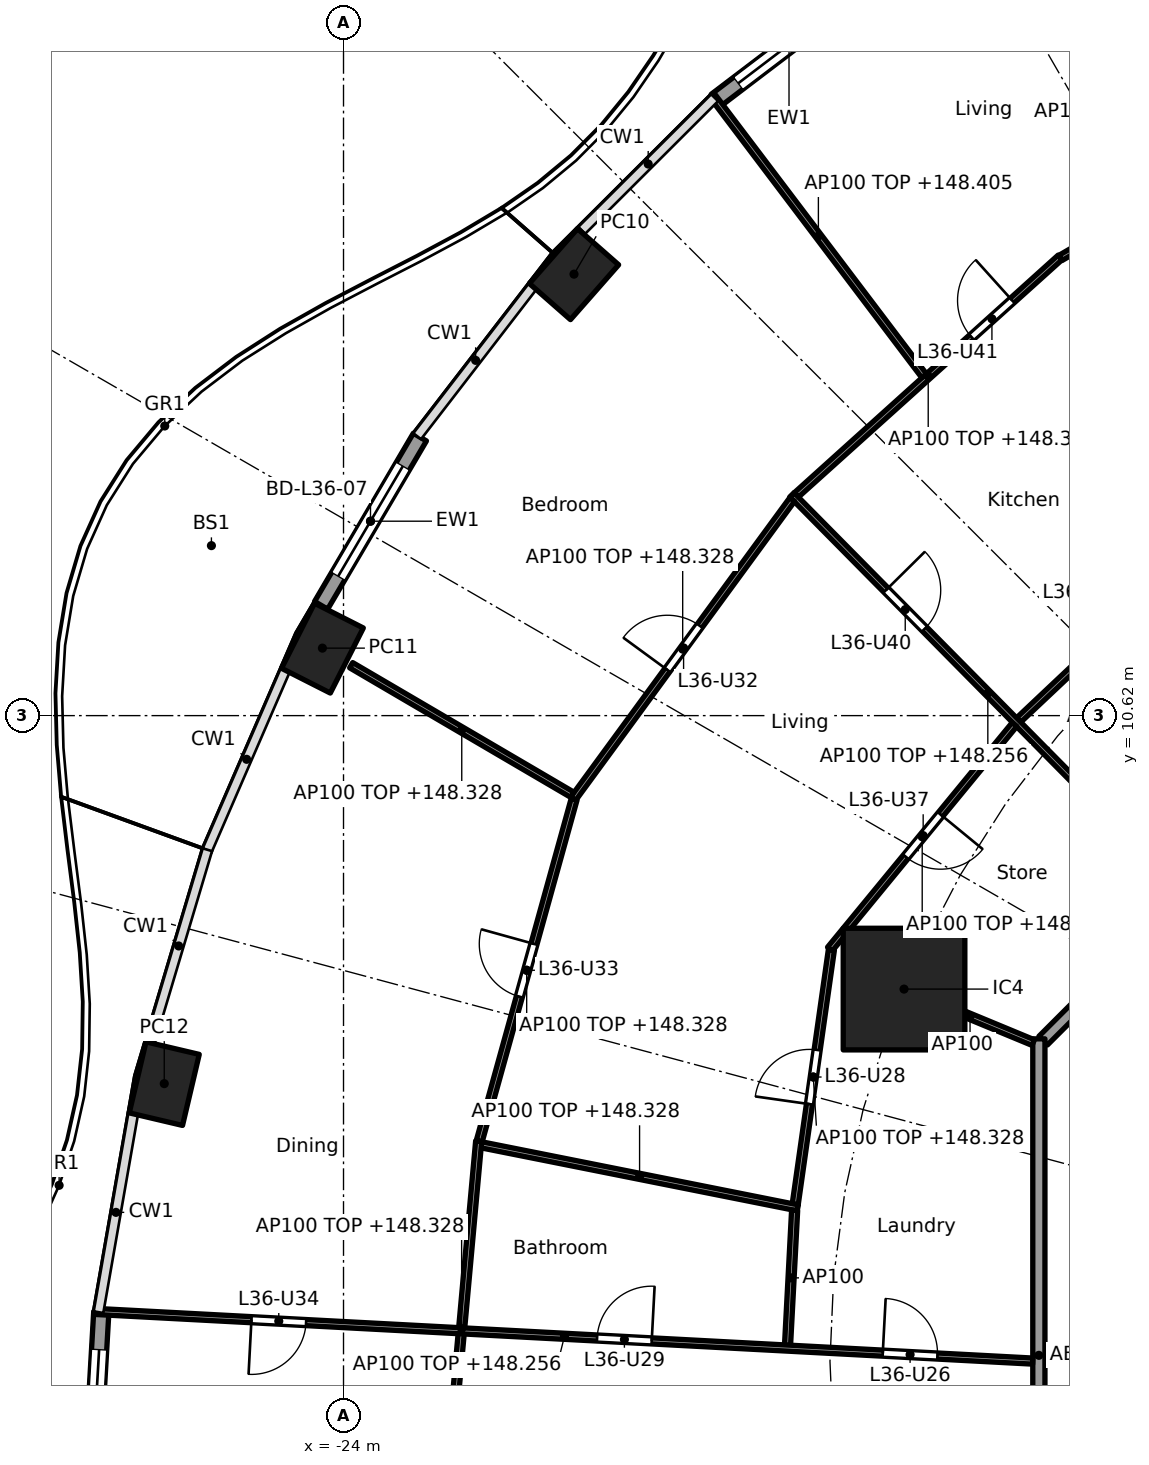
"""IFC4 building model, lengths in metres.
Left out: names, types, materials, properties, quantities, classifications, styles, units other than length and angle.
Written with IfcOpenShell. Run it as: python <this file> out.ifc"""

import sys

from ifc_helpers import new_model, si_unit, direction, frame, frame_2d, origin, origin_2d, place, context, subcontext, project, spatial, rectangle, hollow_rectangle, extrude, element, fill, save


model = new_model("IFC4")
c1 = context("Model", 3, precision=1e-05, world=origin(), true_north=direction((0.0, 1.0)))
c2 = subcontext(c1, "Body", "Model", "MODEL_VIEW")
j1 = project(units=[si_unit("LENGTHUNIT", "METRE"), si_unit("PLANEANGLEUNIT", "RADIAN")], contexts=[c1])
p1 = place(None, origin())
s1 = spatial("IfcSite", under=j1, at=p1, CompositionType="ELEMENT")
p2 = place(p1, origin())
s2 = spatial("IfcBuilding", under=s1, at=p2, CompositionType="ELEMENT")
p3 = place(p2, frame((0.0, 0.0, 145.5)))
s3 = spatial("IfcBuildingStorey", under=s2, at=p3, CompositionType="ELEMENT", Elevation=145.5)
for number, where, z_axis, x_axis in (
    (1, (-20.209, 17.88, 0.0), (0.0, 0.0, 1.0), (-0.66, -0.751, 0.0)),
    (2, (-24.347, 11.73, 0.0), (0.0, 0.0, 1.0), (-0.452, -0.892, 0.0)),
    (3, (-26.948, 4.568, 0.0), (0.0, 0.0, 1.0), (-0.229, -0.973, 0.0)),
):
    element("IfcColumn", number, at=place(p3, frame(where, z_axis=z_axis, x_axis=x_axis)), inside=s3, PredefinedType="COLUMN", context=c2, shape_type="SweptSolid", body=[
        extrude(hollow_rectangle(XDim=1.2, YDim=0.9, WallThickness=0.04, at=origin_2d()), origin(), (0.0, 0.0, 1.0), 3.7),
    ])
p4 = place(p3, frame((-14.782, 6.123, 0.0), z_axis=(0.0, 0.0, 1.0), x_axis=(1.0, 0.0, 0.0)))
e4 = element("IfcColumn", 4, at=p4, inside=s3, PredefinedType="COLUMN", context=c2, shape_type="SweptSolid", body=[
    extrude(rectangle(XDim=2.0, YDim=2.0, at=origin_2d()), origin(), (0.0, 0.0, 1.0), 3.7),
])
p5 = place(p3, frame((-17.878, 20.738, 0.0), z_axis=(0.0, 0.0, 1.0), x_axis=(0.796022231079, 0.605267385233, 0.0)))
e5 = element("IfcWall", 5, at=p5, inside=s3, PredefinedType="SOLIDWALL", context=c2, shape_type="SweptSolid", body=[
    extrude(rectangle(XDim=3.026, YDim=0.25, at=frame_2d((1.513, 0.0))), origin(), (0.0, 0.0, 1.0), 3.44),
])
p6 = place(p5, frame((0.463, 0.0, 0.0)))
e6 = element("IfcOpeningElement", 6, at=p6, cuts=e5, PredefinedType="OPENING", context=c2, shape_type="SweptSolid", body=[
    extrude(rectangle(XDim=2.1, YDim=2.4, at=frame_2d((1.05, 1.2))), frame((0.0, 0.135, 0.0), z_axis=(0.0, -1.0, 0.0), x_axis=(1.0, 0.0, 0.0)), (0.0, 0.0, 1.0), 0.27),
])
p7 = place(p3, frame((-24.368, 12.434, 0.0), z_axis=(0.0, 0.0, 1.0), x_axis=(0.506314982873, 0.862348617508, 0.0)))
e7 = element("IfcWall", 7, at=p7, inside=s3, PredefinedType="SOLIDWALL", context=c2, shape_type="SweptSolid", body=[
    extrude(rectangle(XDim=3.208, YDim=0.25, at=frame_2d((1.604, 0.0))), origin(), (0.0, 0.0, 1.0), 3.44),
])
p8 = place(p7, frame((0.554, 0.0, 0.0)))
e8 = element("IfcOpeningElement", 8, at=p8, cuts=e7, PredefinedType="OPENING", context=c2, shape_type="SweptSolid", body=[
    extrude(rectangle(XDim=2.1, YDim=2.4, at=frame_2d((1.05, 1.2))), frame((0.0, 0.135, 0.0), z_axis=(0.0, -1.0, 0.0), x_axis=(1.0, 0.0, 0.0)), (0.0, 0.0, 1.0), 0.27),
])
p9 = place(p3, frame((-28.176, -2.526, 0.0), z_axis=(0.0, 0.0, 1.0), x_axis=(0.057537829427, 0.998343326809, 0.0)))
e9 = element("IfcWall", 9, at=p9, inside=s3, PredefinedType="SOLIDWALL", context=c2, shape_type="SweptSolid", body=[
    extrude(rectangle(XDim=3.348, YDim=0.25, at=frame_2d((1.674, 0.0))), origin(), (0.0, 0.0, 1.0), 3.44),
])
p10 = place(p9, frame((0.624, 0.0, 0.0)))
e10 = element("IfcOpeningElement", 10, at=p10, cuts=e9, PredefinedType="OPENING", context=c2, shape_type="SweptSolid", body=[
    extrude(rectangle(XDim=2.1, YDim=2.4, at=frame_2d((1.05, 1.2))), frame((0.0, 0.135, 0.0), z_axis=(0.0, -1.0, 0.0), x_axis=(1.0, 0.0, 0.0)), (0.0, 0.0, 1.0), 0.27),
])
p11 = place(p3, frame((-5.275, 12.494, 0.0), z_axis=(0.0, 0.0, 1.0), x_axis=(-0.707106781187, -0.707106781187, 0.0)))
e11 = element("IfcWall", 11, at=p11, inside=s3, PredefinedType="PARTITIONING", context=c2, shape_type="SweptSolid", body=[
    extrude(rectangle(XDim=10.209, YDim=0.2, at=frame_2d((5.104, 0.0))), origin(), (0.0, 0.0, 1.0), 3.44),
])
p12 = place(p3, frame((-12.565, 5.304, 0.0), z_axis=(0.0, 0.0, 1.0), x_axis=(0.0, -1.0, 0.0)))
e12 = element("IfcWall", 12, at=p12, inside=s3, PredefinedType="PARTITIONING", context=c2, shape_type="SweptSolid", body=[
    extrude(rectangle(XDim=10.409, YDim=0.2, at=frame_2d((5.205, 0.0))), origin(), (0.0, 0.0, 1.0), 3.44),
])
p13 = place(p12, frame((6.539, 0.0, 0.0)))
e13 = element("IfcOpeningElement", 13, at=p13, cuts=e12, PredefinedType="OPENING", context=c2, shape_type="SweptSolid", body=[
    extrude(rectangle(XDim=1.0, YDim=2.1, at=frame_2d((0.5, 1.05))), frame((0.0, 0.11, 0.0), z_axis=(0.0, -1.0, 0.0), x_axis=(1.0, 0.0, 0.0)), (0.0, 0.0, 1.0), 0.22),
])
p14 = place(p3, frame((-7.543, 20.853, 0.0), z_axis=(0.0, 0.0, 1.0), x_axis=(-0.865086194899, -0.501623240485, 0.0)))
e14 = element("IfcWall", 14, at=p14, inside=s3, PredefinedType="PARTITIONING", context=c2, shape_type="SweptSolid", body=[
    extrude(rectangle(XDim=5.393, YDim=0.1, at=frame_2d((2.697, 0.0))), origin(), (0.0, 0.0, 1.0), 2.828),
])
p15 = place(p3, frame((-9.622, 13.634, 0.0), z_axis=(0.0, 0.0, 1.0), x_axis=(-0.727710859679, -0.685884031528, 0.0)))
e15 = element("IfcWall", 15, at=p15, inside=s3, PredefinedType="PARTITIONING", context=c2, shape_type="SweptSolid", body=[
    extrude(rectangle(XDim=4.5, YDim=0.1, at=frame_2d((2.25, 0.0))), origin(), (0.0, 0.0, 1.0), 2.828),
])
p16 = place(p15, frame((1.825, 0.0, 0.0)))
e16 = element("IfcOpeningElement", 16, at=p16, cuts=e15, PredefinedType="OPENING", context=c2, shape_type="SweptSolid", body=[
    extrude(rectangle(XDim=0.9, YDim=2.1, at=frame_2d((0.45, 1.05))), frame((0.0, 0.06, 0.0), z_axis=(0.0, -1.0, 0.0), x_axis=(1.0, 0.0, 0.0)), (0.0, 0.0, 1.0), 0.12),
])
p17 = place(p3, frame((-12.215, 18.156, 0.0), z_axis=(0.0, 0.0, 1.0), x_axis=(-0.743159001815, -0.669114861606, 0.0)))
e17 = element("IfcWall", 17, at=p17, inside=s3, PredefinedType="PARTITIONING", context=c2, shape_type="SweptSolid", body=[
    extrude(rectangle(XDim=5.839, YDim=0.1, at=frame_2d((2.92, 0.0))), origin(), (0.0, 0.0, 1.0), 2.828),
])
p18 = place(p17, frame((1.06, 0.0, 0.0)))
e18 = element("IfcOpeningElement", 18, at=p18, cuts=e17, PredefinedType="OPENING", context=c2, shape_type="SweptSolid", body=[
    extrude(rectangle(XDim=0.9, YDim=2.1, at=frame_2d((0.45, 1.05))), frame((0.0, 0.06, 0.0), z_axis=(0.0, -1.0, 0.0), x_axis=(1.0, 0.0, 0.0)), (0.0, 0.0, 1.0), 0.12),
])
p19 = place(p3, frame((-14.452, 16.208, 0.0), z_axis=(0.0, 0.0, 1.0), x_axis=(-0.603267974074, 0.797538557975, 0.0)))
e19 = element("IfcWall", 19, at=p19, inside=s3, PredefinedType="PARTITIONING", context=c2, shape_type="SweptSolid", body=[
    extrude(rectangle(XDim=5.764, YDim=0.1, at=frame_2d((2.882, 0.0))), origin(), (0.0, 0.0, 1.0), 2.905),
])
p20 = place(p3, frame((-10.182, 7.729, 0.0), z_axis=(0.0, 0.0, 1.0), x_axis=(-0.702927211734, 0.711261790766, 0.0)))
e20 = element("IfcWall", 20, at=p20, inside=s3, PredefinedType="PARTITIONING", context=c2, shape_type="SweptSolid", body=[
    extrude(rectangle(XDim=9.168, YDim=0.1, at=frame_2d((4.584, 0.0))), origin(), (0.0, 0.0, 1.0), 2.756),
])
p21 = place(p20, frame((6.067, 0.0, 0.0)))
e21 = element("IfcOpeningElement", 21, at=p21, cuts=e20, PredefinedType="OPENING", context=c2, shape_type="SweptSolid", body=[
    extrude(rectangle(XDim=0.9, YDim=2.1, at=frame_2d((0.45, 1.05))), frame((0.0, 0.06, 0.0), z_axis=(0.0, -1.0, 0.0), x_axis=(1.0, 0.0, 0.0)), (0.0, 0.0, 1.0), 0.12),
])
p22 = place(p3, frame((-12.965, 10.475, 0.0), z_axis=(0.0, 0.0, 1.0), x_axis=(-0.634932102074, -0.772567942485, 0.0)))
e22 = element("IfcWall", 22, at=p22, inside=s3, PredefinedType="PARTITIONING", context=c2, shape_type="SweptSolid", body=[
    extrude(rectangle(XDim=4.782, YDim=0.1, at=frame_2d((2.391, 0.0))), origin(), (0.0, 0.0, 1.0), 2.828),
])
p23 = place(p22, frame((1.916, 0.0, 0.0)))
e23 = element("IfcOpeningElement", 23, at=p23, cuts=e22, PredefinedType="OPENING", context=c2, shape_type="SweptSolid", body=[
    extrude(rectangle(XDim=0.9, YDim=2.1, at=frame_2d((0.45, 1.05))), frame((0.0, 0.06, 0.0), z_axis=(0.0, -1.0, 0.0), x_axis=(1.0, 0.0, 0.0)), (0.0, 0.0, 1.0), 0.12),
])
p24 = place(p3, frame((-16.621, 14.174, 0.0), z_axis=(0.0, 0.0, 1.0), x_axis=(-0.590672767272, -0.806911198338, 0.0)))
e24 = element("IfcWall", 24, at=p24, inside=s3, PredefinedType="PARTITIONING", context=c2, shape_type="SweptSolid", body=[
    extrude(rectangle(XDim=6.099, YDim=0.1, at=frame_2d((3.05, 0.0))), origin(), (0.0, 0.0, 1.0), 2.828),
])
p25 = place(p24, frame((2.574, 0.0, 0.0)))
e25 = element("IfcOpeningElement", 25, at=p25, cuts=e24, PredefinedType="OPENING", context=c2, shape_type="SweptSolid", body=[
    extrude(rectangle(XDim=0.9, YDim=2.1, at=frame_2d((0.45, 1.05))), frame((0.0, 0.06, 0.0), z_axis=(0.0, -1.0, 0.0), x_axis=(1.0, 0.0, 0.0)), (0.0, 0.0, 1.0), 0.12),
])
p26 = place(p3, frame((-12.657, 5.243, 0.0), z_axis=(0.0, 0.0, 1.0), x_axis=(-0.923864733477, 0.382719158442, 0.0)))
e26 = element("IfcWall", 26, at=p26, inside=s3, PredefinedType="PARTITIONING", context=c2, shape_type="SweptSolid", body=[
    extrude(rectangle(XDim=2.25, YDim=0.1, at=frame_2d((1.125, 0.0))), origin(), (0.0, 0.0, 1.0), 3.44),
])
p27 = place(p3, frame((-15.977, 6.769, 0.0), z_axis=(0.0, 0.0, 1.0), x_axis=(-0.140693592547, -0.990053186963, 0.0)))
e27 = element("IfcWall", 27, at=p27, inside=s3, PredefinedType="PARTITIONING", context=c2, shape_type="SweptSolid", body=[
    extrude(rectangle(XDim=4.227, YDim=0.1, at=frame_2d((2.114, 0.0))), origin(), (0.0, 0.0, 1.0), 2.828),
])
p28 = place(p27, frame((1.664, 0.0, 0.0)))
e28 = element("IfcOpeningElement", 28, at=p28, cuts=e27, PredefinedType="OPENING", context=c2, shape_type="SweptSolid", body=[
    extrude(rectangle(XDim=0.9, YDim=2.1, at=frame_2d((0.45, 1.05))), frame((0.0, 0.06, 0.0), z_axis=(0.0, -1.0, 0.0), x_axis=(1.0, 0.0, 0.0)), (0.0, 0.0, 1.0), 0.12),
])
p29 = place(p3, frame((-20.237, 9.319, 0.0), z_axis=(0.0, 0.0, 1.0), x_axis=(-0.862867843769, 0.505429603593, 0.0)))
e29 = element("IfcWall", 29, at=p29, inside=s3, PredefinedType="PARTITIONING", context=c2, shape_type="SweptSolid", body=[
    extrude(rectangle(XDim=4.215, YDim=0.1, at=frame_2d((2.107, 0.0))), origin(), (0.0, 0.0, 1.0), 2.828),
])
p30 = place(p3, frame((-20.207, 9.245, 0.0), z_axis=(0.0, 0.0, 1.0), x_axis=(-0.267400122135, -0.963585582438, 0.0)))
e30 = element("IfcWall", 30, at=p30, inside=s3, PredefinedType="PARTITIONING", context=c2, shape_type="SweptSolid", body=[
    extrude(rectangle(XDim=5.838, YDim=0.1, at=frame_2d((2.919, 0.0))), origin(), (0.0, 0.0, 1.0), 2.828),
])
p31 = place(p30, frame((2.469, 0.0, 0.0)))
e31 = element("IfcOpeningElement", 31, at=p31, cuts=e30, PredefinedType="OPENING", context=c2, shape_type="SweptSolid", body=[
    extrude(rectangle(XDim=0.9, YDim=2.1, at=frame_2d((0.45, 1.05))), frame((0.0, 0.06, 0.0), z_axis=(0.0, -1.0, 0.0), x_axis=(1.0, 0.0, 0.0)), (0.0, 0.0, 1.0), 0.12),
])
p32 = place(p3, frame((-16.53, 2.525, 0.0), z_axis=(0.0, 0.0, 1.0), x_axis=(-0.980716720387, 0.195434680531, 0.0)))
e32 = element("IfcWall", 32, at=p32, inside=s3, PredefinedType="PARTITIONING", context=c2, shape_type="SweptSolid", body=[
    extrude(rectangle(XDim=5.305, YDim=0.1, at=frame_2d((2.653, 0.0))), origin(), (0.0, 0.0, 1.0), 2.828),
])
p33 = place(p3, frame((-16.581, 2.485, 0.0), z_axis=(0.0, 0.0, 1.0), x_axis=(-0.052455156936, -0.998623280577, 0.0)))
e33 = element("IfcWall", 33, at=p33, inside=s3, PredefinedType="PARTITIONING", context=c2, shape_type="SweptSolid", body=[
    extrude(rectangle(XDim=2.225, YDim=0.1, at=frame_2d((1.112, 0.0))), origin(), (0.0, 0.0, 1.0), 3.44),
])
p34 = place(p3, frame((-21.777, 3.621, 0.0), z_axis=(0.0, 0.0, 1.0), x_axis=(-0.090606877484, -0.995886737412, 0.0)))
e34 = element("IfcWall", 34, at=p34, inside=s3, PredefinedType="PARTITIONING", context=c2, shape_type="SweptSolid", body=[
    extrude(rectangle(XDim=6.189, YDim=0.1, at=frame_2d((3.095, 0.0))), origin(), (0.0, 0.0, 1.0), 2.828),
])
p35 = place(p3, frame((-12.665, 0.005, 0.0), z_axis=(0.0, 0.0, 1.0), x_axis=(-0.998599229025, 0.052911055468, 0.0)))
e35 = element("IfcWall", 35, at=p35, inside=s3, PredefinedType="PARTITIONING", context=c2, shape_type="SweptSolid", body=[
    extrude(rectangle(XDim=15.425, YDim=0.1, at=frame_2d((7.713, 0.0))), origin(), (0.0, 0.0, 1.0), 2.756),
])
p36 = place(p35, frame((1.571, 0.0, 0.0)))
e36 = element("IfcOpeningElement", 36, at=p36, cuts=e35, PredefinedType="OPENING", context=c2, shape_type="SweptSolid", body=[
    extrude(rectangle(XDim=0.9, YDim=2.1, at=frame_2d((0.45, 1.05))), frame((0.0, 0.06, 0.0), z_axis=(0.0, -1.0, 0.0), x_axis=(1.0, 0.0, 0.0)), (0.0, 0.0, 1.0), 0.12),
])
p37 = place(p35, frame((6.276, 0.0, 0.0)))
e37 = element("IfcOpeningElement", 37, at=p37, cuts=e35, PredefinedType="OPENING", context=c2, shape_type="SweptSolid", body=[
    extrude(rectangle(XDim=0.9, YDim=2.1, at=frame_2d((0.45, 1.05))), frame((0.0, 0.06, 0.0), z_axis=(0.0, -1.0, 0.0), x_axis=(1.0, 0.0, 0.0)), (0.0, 0.0, 1.0), 0.12),
])
p38 = place(p35, frame((11.967, 0.0, 0.0)))
e38 = element("IfcOpeningElement", 38, at=p38, cuts=e35, PredefinedType="OPENING", context=c2, shape_type="SweptSolid", body=[
    extrude(rectangle(XDim=0.9, YDim=2.1, at=frame_2d((0.45, 1.05))), frame((0.0, 0.06, 0.0), z_axis=(0.0, -1.0, 0.0), x_axis=(1.0, 0.0, 0.0)), (0.0, 0.0, 1.0), 0.12),
])
p39 = place(p6, origin())
e39 = element("IfcDoor", 39, at=p39, inside=s3, OperationType="SLIDING_TO_LEFT", PredefinedType="DOOR", context=c2, shape_type="SweptSolid", body=[
    extrude(rectangle(XDim=2.1, YDim=2.4, at=frame_2d((1.05, 1.2))), frame((0.0, 0.025, 0.0), z_axis=(0.0, -1.0, 0.0), x_axis=(1.0, 0.0, 0.0)), (0.0, 0.0, 1.0), 0.05),
])
fill(e6, e39)
p40 = place(p8, origin())
e40 = element("IfcDoor", 40, at=p40, inside=s3, OperationType="SLIDING_TO_LEFT", PredefinedType="DOOR", context=c2, shape_type="SweptSolid", body=[
    extrude(rectangle(XDim=2.1, YDim=2.4, at=frame_2d((1.05, 1.2))), frame((0.0, 0.025, 0.0), z_axis=(0.0, -1.0, 0.0), x_axis=(1.0, 0.0, 0.0)), (0.0, 0.0, 1.0), 0.05),
])
fill(e8, e40)
p41 = place(p10, origin())
e41 = element("IfcDoor", 41, at=p41, inside=s3, OperationType="SLIDING_TO_LEFT", PredefinedType="DOOR", context=c2, shape_type="SweptSolid", body=[
    extrude(rectangle(XDim=2.1, YDim=2.4, at=frame_2d((1.05, 1.2))), frame((0.0, 0.025, 0.0), z_axis=(0.0, -1.0, 0.0), x_axis=(1.0, 0.0, 0.0)), (0.0, 0.0, 1.0), 0.05),
])
fill(e10, e41)
p42 = place(p36, frame((0.9, 0.0, 0.0), x_axis=(-1.0, 0.0, 0.0)))
e42 = element("IfcDoor", 42, at=p42, inside=s3, OperationType="SINGLE_SWING_LEFT", PredefinedType="DOOR", context=c2, shape_type="SweptSolid", body=[
    extrude(rectangle(XDim=0.9, YDim=2.1, at=frame_2d((0.45, 1.05))), frame((0.0, 0.025, 0.0), z_axis=(0.0, -1.0, 0.0), x_axis=(1.0, 0.0, 0.0)), (0.0, 0.0, 1.0), 0.05),
])
fill(e36, e42)
p43 = place(p28, frame((0.9, 0.0, 0.0), x_axis=(-1.0, 0.0, 0.0)))
e43 = element("IfcDoor", 43, at=p43, inside=s3, OperationType="SINGLE_SWING_LEFT", PredefinedType="DOOR", context=c2, shape_type="SweptSolid", body=[
    extrude(rectangle(XDim=0.9, YDim=2.1, at=frame_2d((0.45, 1.05))), frame((0.0, 0.025, 0.0), z_axis=(0.0, -1.0, 0.0), x_axis=(1.0, 0.0, 0.0)), (0.0, 0.0, 1.0), 0.05),
])
fill(e28, e43)
p44 = place(p37, frame((0.9, 0.0, 0.0), x_axis=(-1.0, 0.0, 0.0)))
e44 = element("IfcDoor", 44, at=p44, inside=s3, OperationType="SINGLE_SWING_RIGHT", PredefinedType="DOOR", context=c2, shape_type="SweptSolid", body=[
    extrude(rectangle(XDim=0.9, YDim=2.1, at=frame_2d((0.45, 1.05))), frame((0.0, 0.025, 0.0), z_axis=(0.0, -1.0, 0.0), x_axis=(1.0, 0.0, 0.0)), (0.0, 0.0, 1.0), 0.05),
])
fill(e37, e44)
p45 = place(p25, frame((0.9, 0.0, 0.0), x_axis=(-1.0, 0.0, 0.0)))
e45 = element("IfcDoor", 45, at=p45, inside=s3, OperationType="SINGLE_SWING_LEFT", PredefinedType="DOOR", context=c2, shape_type="SweptSolid", body=[
    extrude(rectangle(XDim=0.9, YDim=2.1, at=frame_2d((0.45, 1.05))), frame((0.0, 0.025, 0.0), z_axis=(0.0, -1.0, 0.0), x_axis=(1.0, 0.0, 0.0)), (0.0, 0.0, 1.0), 0.05),
])
fill(e25, e45)
p46 = place(p31, frame((0.9, 0.0, 0.0), x_axis=(-1.0, 0.0, 0.0)))
e46 = element("IfcDoor", 46, at=p46, inside=s3, OperationType="SINGLE_SWING_RIGHT", PredefinedType="DOOR", context=c2, shape_type="SweptSolid", body=[
    extrude(rectangle(XDim=0.9, YDim=2.1, at=frame_2d((0.45, 1.05))), frame((0.0, 0.025, 0.0), z_axis=(0.0, -1.0, 0.0), x_axis=(1.0, 0.0, 0.0)), (0.0, 0.0, 1.0), 0.05),
])
fill(e31, e46)
p47 = place(p38, origin())
e47 = element("IfcDoor", 47, at=p47, inside=s3, OperationType="SINGLE_SWING_RIGHT", PredefinedType="DOOR", context=c2, shape_type="SweptSolid", body=[
    extrude(rectangle(XDim=0.9, YDim=2.1, at=frame_2d((0.45, 1.05))), frame((0.0, 0.025, 0.0), z_axis=(0.0, -1.0, 0.0), x_axis=(1.0, 0.0, 0.0)), (0.0, 0.0, 1.0), 0.05),
])
fill(e38, e47)
p48 = place(p23, origin())
e48 = element("IfcDoor", 48, at=p48, inside=s3, OperationType="SINGLE_SWING_LEFT", PredefinedType="DOOR", context=c2, shape_type="SweptSolid", body=[
    extrude(rectangle(XDim=0.9, YDim=2.1, at=frame_2d((0.45, 1.05))), frame((0.0, 0.025, 0.0), z_axis=(0.0, -1.0, 0.0), x_axis=(1.0, 0.0, 0.0)), (0.0, 0.0, 1.0), 0.05),
])
fill(e23, e48)
p49 = place(p21, frame((0.9, 0.0, 0.0), x_axis=(-1.0, 0.0, 0.0)))
e49 = element("IfcDoor", 49, at=p49, inside=s3, OperationType="SINGLE_SWING_LEFT", PredefinedType="DOOR", context=c2, shape_type="SweptSolid", body=[
    extrude(rectangle(XDim=0.9, YDim=2.1, at=frame_2d((0.45, 1.05))), frame((0.0, 0.025, 0.0), z_axis=(0.0, -1.0, 0.0), x_axis=(1.0, 0.0, 0.0)), (0.0, 0.0, 1.0), 0.05),
])
fill(e21, e49)
p50 = place(p18, frame((0.9, 0.0, 0.0), x_axis=(-1.0, 0.0, 0.0)))
e50 = element("IfcDoor", 50, at=p50, inside=s3, OperationType="SINGLE_SWING_RIGHT", PredefinedType="DOOR", context=c2, shape_type="SweptSolid", body=[
    extrude(rectangle(XDim=0.9, YDim=2.1, at=frame_2d((0.45, 1.05))), frame((0.0, 0.025, 0.0), z_axis=(0.0, -1.0, 0.0), x_axis=(1.0, 0.0, 0.0)), (0.0, 0.0, 1.0), 0.05),
])
fill(e18, e50)
save(model, sys.argv[1])
